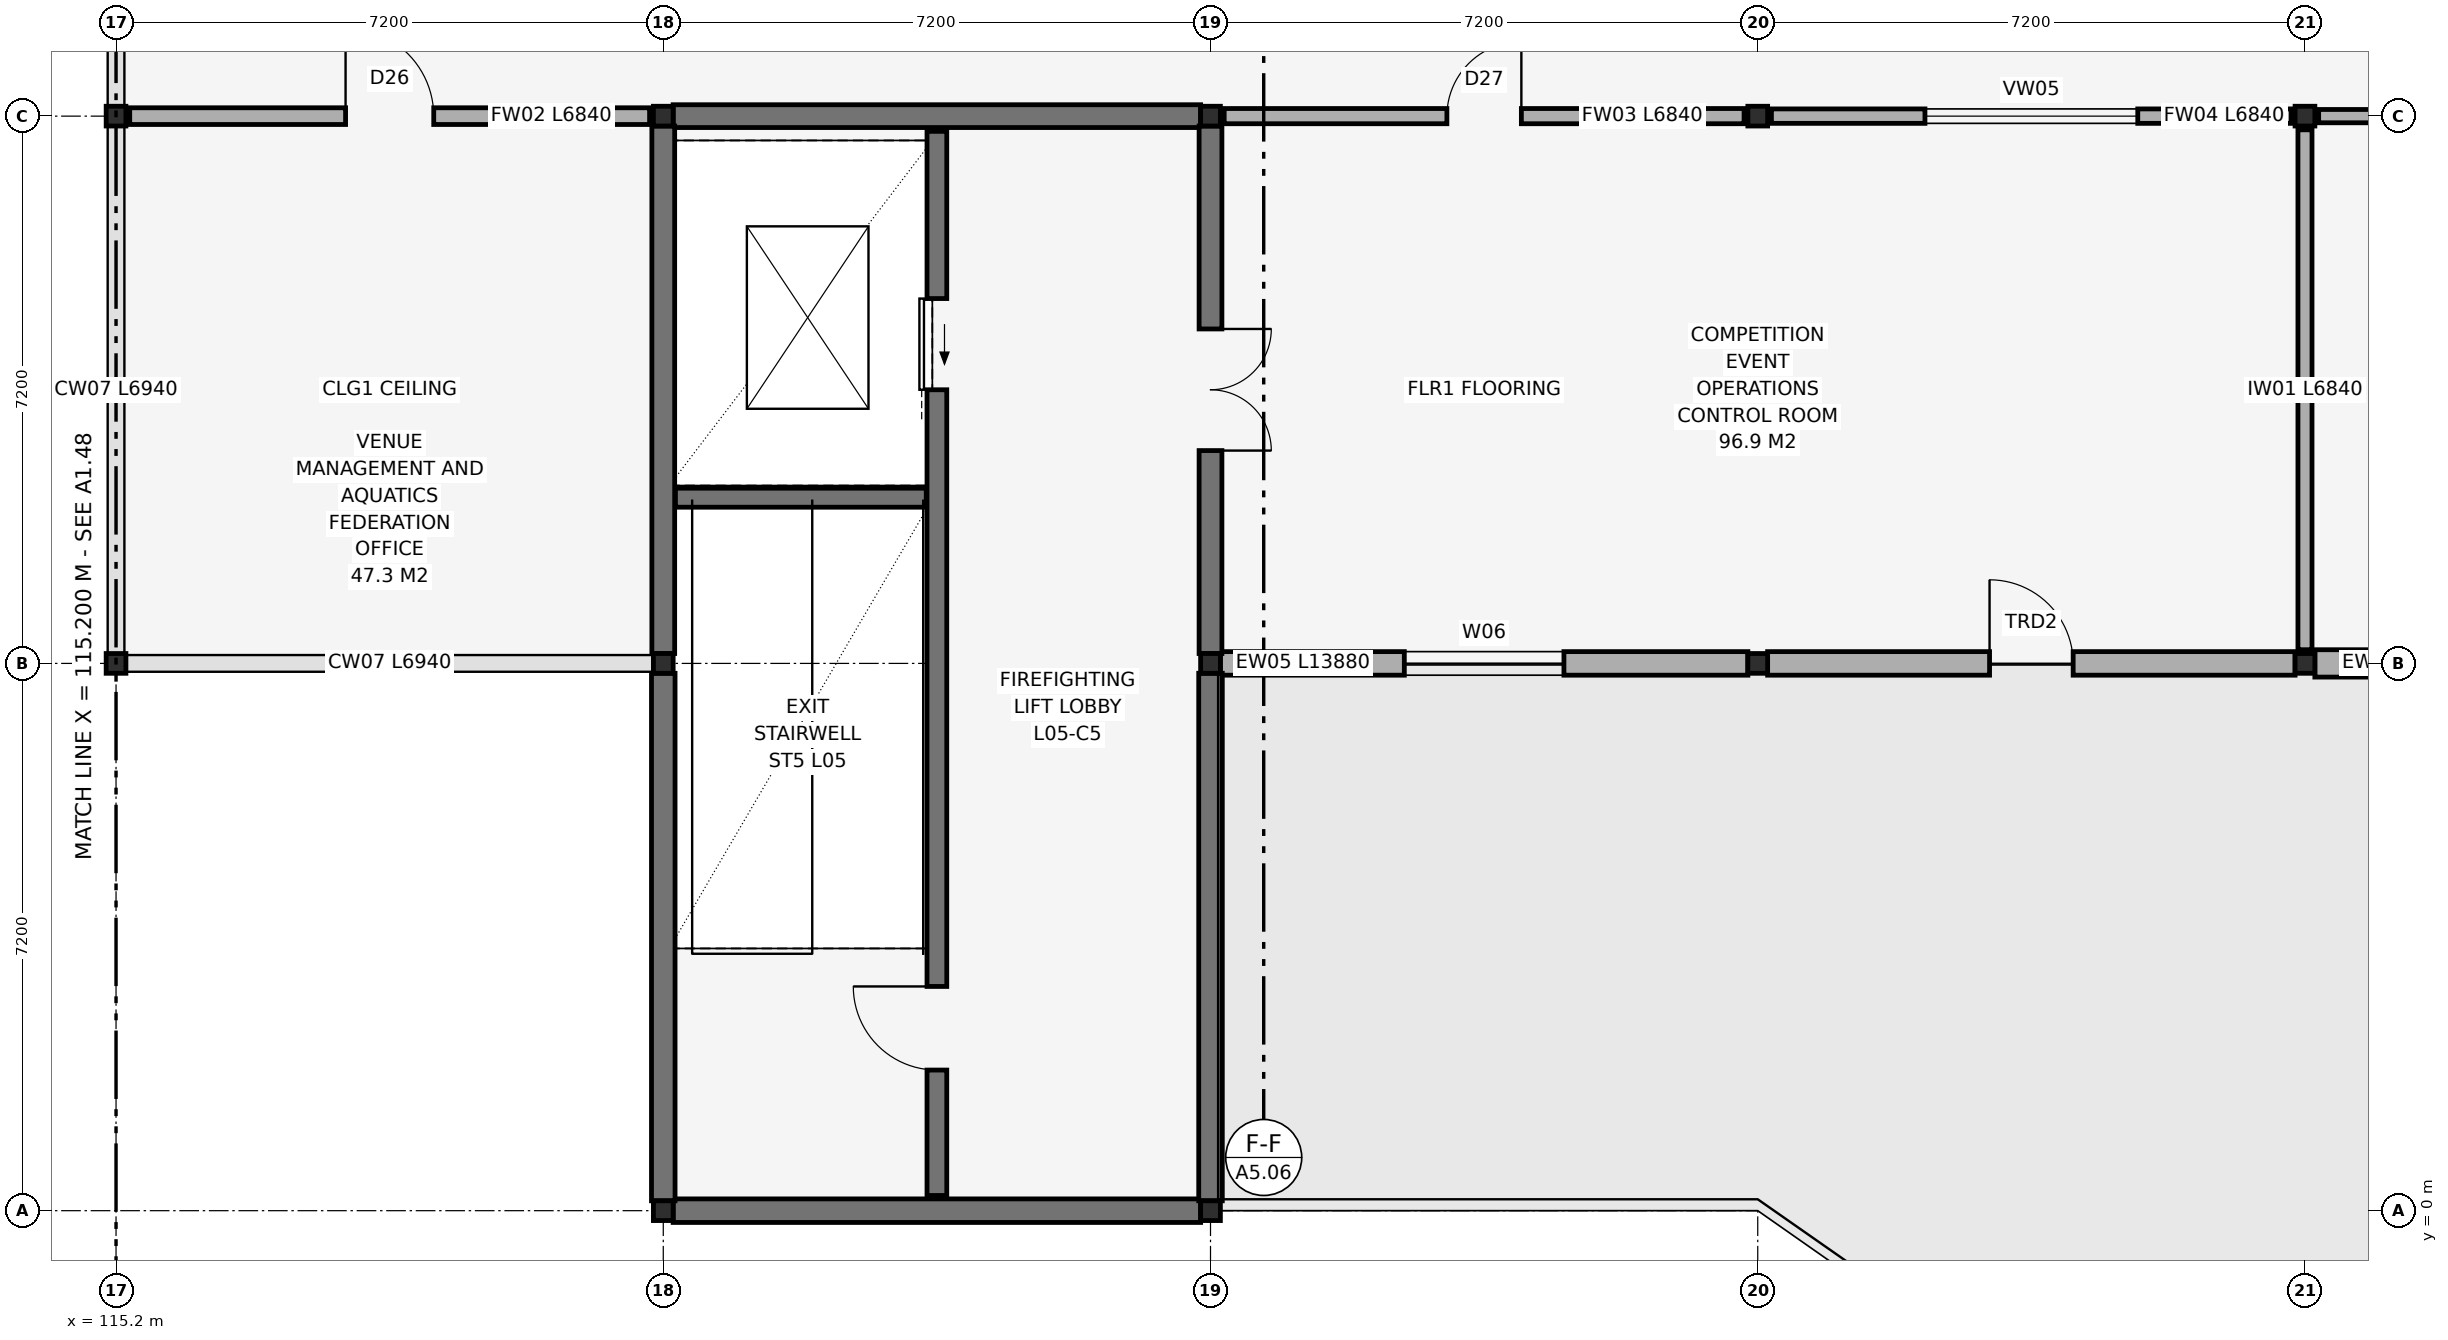
"""IFC4 building model, lengths in metres.
Left out: names, types, materials, properties, quantities, classifications, styles, units other than length and angle.
Written with IfcOpenShell. Run it as: python <this file> out.ifc"""

import sys

from ifc_helpers import new_model, si_unit, direction, frame, frame_2d, origin, origin_2d, place, context, subcontext, project, spatial, rectangle, hollow_rectangle, extrude, element, fill, save


model = new_model("IFC4")
c1 = context("Model", 3, precision=1e-05, world=origin(), true_north=direction((0.0, 1.0)))
c2 = subcontext(c1, "Body", "Model", "MODEL_VIEW")
j1 = project(units=[si_unit("LENGTHUNIT", "METRE"), si_unit("PLANEANGLEUNIT", "RADIAN")], contexts=[c1])
p1 = place(None, origin())
s1 = spatial("IfcSite", under=j1, at=p1, CompositionType="ELEMENT")
p2 = place(p1, origin())
s2 = spatial("IfcBuilding", under=s1, at=p2, CompositionType="ELEMENT")
p3 = place(p2, frame((0.0, 0.0, 23.4)))
s3 = spatial("IfcBuildingStorey", under=s2, at=p3, CompositionType="ELEMENT", Elevation=23.4)
for number, where, z_axis, x_axis in (
    (1, (115.2, 7.2, 0.0), (0.0, 0.0, 1.0), (1.0, 0.0, 0.0)),
    (2, (115.2, 14.4, 0.0), (0.0, 0.0, 1.0), (1.0, 0.0, 0.0)),
    (3, (122.4, 0.0, 0.0), (0.0, 0.0, 1.0), (1.0, 0.0, 0.0)),
    (4, (122.4, 7.2, 0.0), (0.0, 0.0, 1.0), (1.0, 0.0, 0.0)),
    (5, (122.4, 14.4, 0.0), (0.0, 0.0, 1.0), (1.0, 0.0, 0.0)),
    (6, (129.6, 0.0, 0.0), (0.0, 0.0, 1.0), (1.0, 0.0, 0.0)),
    (7, (129.6, 7.2, 0.0), (0.0, 0.0, 1.0), (1.0, 0.0, 0.0)),
    (8, (129.6, 14.4, 0.0), (0.0, 0.0, 1.0), (1.0, 0.0, 0.0)),
    (9, (136.8, 7.2, 0.0), (0.0, 0.0, 1.0), (1.0, 0.0, 0.0)),
    (10, (136.8, 14.4, 0.0), (0.0, 0.0, 1.0), (1.0, 0.0, 0.0)),
    (11, (144.0, 7.2, 0.0), (0.0, 0.0, 1.0), (1.0, 0.0, 0.0)),
    (12, (144.0, 14.4, 0.0), (0.0, 0.0, 1.0), (1.0, 0.0, 0.0)),
):
    element("IfcColumn", number, at=place(p3, frame(where, z_axis=z_axis, x_axis=x_axis)), inside=s3, PredefinedType="COLUMN", context=c2, shape_type="SweptSolid", body=[
        extrude(hollow_rectangle(XDim=0.26, YDim=0.26, WallThickness=0.012, at=origin_2d()), origin(), (0.0, 0.0, 1.0), 4.2),
    ])
p4 = place(p3, frame((129.73, 7.2, 0.0), z_axis=(0.0, 0.0, 1.0), x_axis=(1.0, 0.0, 0.0)))
e13 = element("IfcWall", 13, at=p4, inside=s3, PredefinedType="SOLIDWALL", context=c2, shape_type="SweptSolid", body=[
    extrude(rectangle(XDim=6.94, YDim=0.31, at=frame_2d((3.47, 0.0))), origin(), (0.0, 0.0, 1.0), 3.505),
])
p5 = place(p4, frame((2.42, 0.0, 0.95)))
e14 = element("IfcOpeningElement", 14, at=p5, cuts=e13, PredefinedType="OPENING", context=c2, shape_type="SweptSolid", body=[
    extrude(rectangle(XDim=2.1, YDim=2.0, at=frame_2d((1.05, 1.0))), frame((0.0, 0.17, 0.0), z_axis=(0.0, -1.0, 0.0), x_axis=(1.0, 0.0, 0.0)), (0.0, 0.0, 1.0), 0.34),
])
p6 = place(p3, frame((136.93, 7.2, 0.0), z_axis=(0.0, 0.0, 1.0), x_axis=(1.0, 0.0, 0.0)))
e15 = element("IfcWall", 15, at=p6, inside=s3, PredefinedType="SOLIDWALL", context=c2, shape_type="SweptSolid", body=[
    extrude(rectangle(XDim=6.94, YDim=0.31, at=frame_2d((3.47, 0.0))), origin(), (0.0, 0.0, 1.0), 3.98),
])
p7 = place(p6, frame((2.92, 0.0, 0.0)))
e16 = element("IfcOpeningElement", 16, at=p7, cuts=e15, PredefinedType="OPENING", context=c2, shape_type="SweptSolid", body=[
    extrude(rectangle(XDim=1.1, YDim=2.2, at=frame_2d((0.55, 1.1))), frame((0.0, 0.17, 0.0), z_axis=(0.0, -1.0, 0.0), x_axis=(1.0, 0.0, 0.0)), (0.0, 0.0, 1.0), 0.34),
])
p8 = place(p3, frame((144.13, 7.2, 0.0), z_axis=(0.0, 0.0, 1.0), x_axis=(1.0, 0.0, 0.0)))
e17 = element("IfcWall", 17, at=p8, inside=s3, PredefinedType="SOLIDWALL", context=c2, shape_type="SweptSolid", body=[
    extrude(rectangle(XDim=6.94, YDim=0.36, at=frame_2d((3.47, 0.0))), origin(), (0.0, 0.0, 1.0), 3.98),
])
p9 = place(p8, frame((2.57, 0.0, 0.95)))
e18 = element("IfcOpeningElement", 18, at=p9, cuts=e17, PredefinedType="OPENING", context=c2, shape_type="SweptSolid", body=[
    extrude(rectangle(XDim=1.8, YDim=1.75, at=frame_2d((0.9, 0.875))), frame((0.0, 0.195, 0.0), z_axis=(0.0, -1.0, 0.0), x_axis=(1.0, 0.0, 0.0)), (0.0, 0.0, 1.0), 0.39),
])
p10 = place(p3, frame((122.53, 0.0, 0.0), z_axis=(0.0, 0.0, 1.0), x_axis=(1.0, 0.0, 0.0)))
e19 = element("IfcWall", 19, at=p10, inside=s3, PredefinedType="SHEAR", context=c2, shape_type="SweptSolid", body=[
    extrude(rectangle(XDim=6.94, YDim=0.31, at=frame_2d((3.47, 0.0))), origin(), (0.0, 0.0, 1.0), 4.0),
])
p11 = place(p3, frame((122.53, 14.4, 0.0), z_axis=(0.0, 0.0, 1.0), x_axis=(1.0, 0.0, 0.0)))
e20 = element("IfcWall", 20, at=p11, inside=s3, PredefinedType="SHEAR", context=c2, shape_type="SweptSolid", body=[
    extrude(rectangle(XDim=6.94, YDim=0.3, at=frame_2d((3.47, 0.0))), origin(), (0.0, 0.0, 1.0), 4.0),
])
p12 = place(p3, frame((122.4, 0.13, 0.0), z_axis=(0.0, 0.0, 1.0), x_axis=(0.0, 1.0, 0.0)))
e21 = element("IfcWall", 21, at=p12, inside=s3, PredefinedType="SHEAR", context=c2, shape_type="SweptSolid", body=[
    extrude(rectangle(XDim=6.94, YDim=0.31, at=frame_2d((3.47, 0.0))), origin(), (0.0, 0.0, 1.0), 4.0),
])
p13 = place(p3, frame((122.4, 7.33, 0.0), z_axis=(0.0, 0.0, 1.0), x_axis=(0.0, 1.0, 0.0)))
e22 = element("IfcWall", 22, at=p13, inside=s3, PredefinedType="SHEAR", context=c2, shape_type="SweptSolid", body=[
    extrude(rectangle(XDim=6.94, YDim=0.3, at=frame_2d((3.47, 0.0))), origin(), (0.0, 0.0, 1.0), 4.0),
])
p14 = place(p3, frame((129.6, 0.13, 0.0), z_axis=(0.0, 0.0, 1.0), x_axis=(0.0, 1.0, 0.0)))
e23 = element("IfcWall", 23, at=p14, inside=s3, PredefinedType="SHEAR", context=c2, shape_type="SweptSolid", body=[
    extrude(rectangle(XDim=6.94, YDim=0.31, at=frame_2d((3.47, 0.0))), origin(), (0.0, 0.0, 1.0), 4.0),
])
p15 = place(p3, frame((129.6, 7.33, 0.0), z_axis=(0.0, 0.0, 1.0), x_axis=(0.0, 1.0, 0.0)))
e24 = element("IfcWall", 24, at=p15, inside=s3, PredefinedType="SHEAR", context=c2, shape_type="SweptSolid", body=[
    extrude(rectangle(XDim=6.94, YDim=0.3, at=frame_2d((3.47, 0.0))), origin(), (0.0, 0.0, 1.0), 4.0),
])
p16 = place(p15, frame((2.67, 0.0, 0.0)))
e25 = element("IfcOpeningElement", 25, at=p16, cuts=e24, PredefinedType="OPENING", context=c2, shape_type="SweptSolid", body=[
    extrude(rectangle(XDim=1.6, YDim=2.2, at=frame_2d((0.8, 1.1))), frame((0.0, 0.165, 0.0), z_axis=(0.0, -1.0, 0.0), x_axis=(1.0, 0.0, 0.0)), (0.0, 0.0, 1.0), 0.33),
])
p17 = place(p3, frame((126.0, 0.2, 0.0), z_axis=(0.0, 0.0, 1.0), x_axis=(0.0, 1.0, 0.0)))
e26 = element("IfcWall", 26, at=p17, inside=s3, PredefinedType="SHEAR", context=c2, shape_type="SweptSolid", body=[
    extrude(rectangle(XDim=14.0, YDim=0.26, at=frame_2d((7.0, 0.0))), origin(), (0.0, 0.0, 1.0), 4.0),
])
p18 = place(p17, frame((1.65, 0.0, 0.0)))
e27 = element("IfcOpeningElement", 27, at=p18, cuts=e26, PredefinedType="OPENING", context=c2, shape_type="SweptSolid", body=[
    extrude(rectangle(XDim=1.1, YDim=2.15, at=frame_2d((0.55, 1.075))), frame((0.0, 0.145, 0.0), z_axis=(0.0, -1.0, 0.0), x_axis=(1.0, 0.0, 0.0)), (0.0, 0.0, 1.0), 0.29),
])
p19 = place(p17, frame((10.6, 0.0, 0.0)))
e28 = element("IfcOpeningElement", 28, at=p19, cuts=e26, PredefinedType="OPENING", context=c2, shape_type="SweptSolid", body=[
    extrude(rectangle(XDim=1.2, YDim=2.25, at=frame_2d((0.6, 1.125))), frame((0.0, 0.145, 0.0), z_axis=(0.0, -1.0, 0.0), x_axis=(1.0, 0.0, 0.0)), (0.0, 0.0, 1.0), 0.29),
])
p20 = place(p3, frame((122.56, 9.38, 0.0), z_axis=(0.0, 0.0, 1.0), x_axis=(1.0, 0.0, 0.0)))
e29 = element("IfcWall", 29, at=p20, inside=s3, PredefinedType="SHEAR", context=c2, shape_type="SweptSolid", body=[
    extrude(rectangle(XDim=3.3, YDim=0.25, at=frame_2d((1.65, 0.0))), origin(), (0.0, 0.0, 1.0), 4.0),
])
p21 = place(p3, frame((115.38, 14.4, 0.0), z_axis=(0.0, 0.0, 1.0), x_axis=(1.0, 0.0, 0.0)))
e30 = element("IfcWall", 30, at=p21, inside=s3, PredefinedType="SOLIDWALL", context=c2, shape_type="SweptSolid", body=[
    extrude(rectangle(XDim=6.84, YDim=0.22, at=frame_2d((3.42, 0.0))), origin(), (0.0, 0.0, 1.0), 3.98),
])
p22 = place(p21, frame((2.84, 0.0, 0.0)))
e31 = element("IfcOpeningElement", 31, at=p22, cuts=e30, PredefinedType="OPENING", context=c2, shape_type="SweptSolid", body=[
    extrude(rectangle(XDim=1.16, YDim=2.2, at=frame_2d((0.58, 1.1))), frame((0.0, 0.125, 0.0), z_axis=(0.0, -1.0, 0.0), x_axis=(1.0, 0.0, 0.0)), (0.0, 0.0, 1.0), 0.25),
])
p23 = place(p3, frame((129.78, 14.4, 0.0), z_axis=(0.0, 0.0, 1.0), x_axis=(1.0, 0.0, 0.0)))
e32 = element("IfcWall", 32, at=p23, inside=s3, PredefinedType="SOLIDWALL", context=c2, shape_type="SweptSolid", body=[
    extrude(rectangle(XDim=6.84, YDim=0.2, at=frame_2d((3.42, 0.0))), origin(), (0.0, 0.0, 1.0), 3.98),
])
p24 = place(p23, frame((2.93, 0.0, 0.0)))
e33 = element("IfcOpeningElement", 33, at=p24, cuts=e32, PredefinedType="OPENING", context=c2, shape_type="SweptSolid", body=[
    extrude(rectangle(XDim=0.98, YDim=2.15, at=frame_2d((0.49, 1.075))), frame((0.0, 0.115, 0.0), z_axis=(0.0, -1.0, 0.0), x_axis=(1.0, 0.0, 0.0)), (0.0, 0.0, 1.0), 0.23),
])
p25 = place(p3, frame((136.98, 14.4, 0.0), z_axis=(0.0, 0.0, 1.0), x_axis=(1.0, 0.0, 0.0)))
e34 = element("IfcWall", 34, at=p25, inside=s3, PredefinedType="SOLIDWALL", context=c2, shape_type="SweptSolid", body=[
    extrude(rectangle(XDim=6.84, YDim=0.19, at=frame_2d((3.42, 0.0))), origin(), (0.0, 0.0, 1.0), 3.98),
])
p26 = place(p25, frame((2.02, 0.0, 0.95)))
e35 = element("IfcOpeningElement", 35, at=p26, cuts=e34, PredefinedType="OPENING", context=c2, shape_type="SweptSolid", body=[
    extrude(rectangle(XDim=2.8, YDim=1.35, at=frame_2d((1.4, 0.675))), frame((0.0, 0.11, 0.0), z_axis=(0.0, -1.0, 0.0), x_axis=(1.0, 0.0, 0.0)), (0.0, 0.0, 1.0), 0.22),
])
p27 = place(p3, frame((144.0, 7.38, 0.0), z_axis=(0.0, 0.0, 1.0), x_axis=(0.0, 1.0, 0.0)))
e36 = element("IfcWall", 36, at=p27, inside=s3, PredefinedType="PARTITIONING", context=c2, shape_type="SweptSolid", body=[
    extrude(rectangle(XDim=6.84, YDim=0.185, at=frame_2d((3.42, 0.0))), origin(), (0.0, 0.0, 1.0), 3.98),
])
p28 = place(p3, frame((144.18, 14.4, 0.0), z_axis=(0.0, 0.0, 1.0), x_axis=(1.0, 0.0, 0.0)))
e37 = element("IfcWall", 37, at=p28, inside=s3, PredefinedType="PARTITIONING", context=c2, shape_type="SweptSolid", body=[
    extrude(rectangle(XDim=6.84, YDim=0.175, at=frame_2d((3.42, 0.0))), origin(), (0.0, 0.0, 1.0), 3.98),
])
p29 = place(p28, frame((2.94, 0.0, 0.0)))
e38 = element("IfcOpeningElement", 38, at=p29, cuts=e37, PredefinedType="OPENING", context=c2, shape_type="SweptSolid", body=[
    extrude(rectangle(XDim=0.96, YDim=2.15, at=frame_2d((0.48, 1.075))), frame((0.0, 0.103, 0.0), z_axis=(0.0, -1.0, 0.0), x_axis=(1.0, 0.0, 0.0)), (0.0, 0.0, 1.0), 0.205),
])
p30 = place(p5, origin())
e39 = element("IfcWindow", 39, at=p30, inside=s3, PartitioningType="SINGLE_PANEL", PredefinedType="WINDOW", context=c2, shape_type="SweptSolid", body=[
    extrude(rectangle(XDim=2.1, YDim=2.0, at=frame_2d((1.05, 1.0))), frame((0.0, 0.03, 0.0), z_axis=(0.0, -1.0, 0.0), x_axis=(1.0, 0.0, 0.0)), (0.0, 0.0, 1.0), 0.06),
])
fill(e14, e39)
p31 = place(p7, frame((1.1, 0.0, 0.0), z_axis=(0.0, 0.0, 1.0), x_axis=(-1.0, 0.0, 0.0)))
e40 = element("IfcDoor", 40, at=p31, inside=s3, OperationType="SINGLE_SWING_RIGHT", PredefinedType="DOOR", context=c2, shape_type="SweptSolid", body=[
    extrude(rectangle(XDim=1.1, YDim=2.2, at=frame_2d((0.55, 1.1))), frame((0.0, 0.025, 0.0), z_axis=(0.0, -1.0, 0.0), x_axis=(1.0, 0.0, 0.0)), (0.0, 0.0, 1.0), 0.05),
])
fill(e16, e40)
p32 = place(p18, origin())
e41 = element("IfcDoor", 41, at=p32, inside=s3, OperationType="SINGLE_SWING_RIGHT", PredefinedType="DOOR", context=c2, shape_type="SweptSolid", body=[
    extrude(rectangle(XDim=1.1, YDim=2.15, at=frame_2d((0.55, 1.075))), frame((0.0, 0.025, 0.0), z_axis=(0.0, -1.0, 0.0), x_axis=(1.0, 0.0, 0.0)), (0.0, 0.0, 1.0), 0.05),
])
fill(e27, e41)
p33 = place(p19, frame((1.2, 0.0, 0.0), z_axis=(0.0, 0.0, 1.0), x_axis=(-1.0, 0.0, 0.0)))
e42 = element("IfcDoor", 42, at=p33, inside=s3, OperationType="SLIDING_TO_LEFT", PredefinedType="DOOR", context=c2, shape_type="SweptSolid", body=[
    extrude(rectangle(XDim=1.2, YDim=2.25, at=frame_2d((0.6, 1.125))), frame((0.0, 0.025, 0.0), z_axis=(0.0, -1.0, 0.0), x_axis=(1.0, 0.0, 0.0)), (0.0, 0.0, 1.0), 0.05),
])
fill(e28, e42)
p34 = place(p16, frame((1.6, 0.0, 0.0), z_axis=(0.0, 0.0, 1.0), x_axis=(-1.0, 0.0, 0.0)))
e43 = element("IfcDoor", 43, at=p34, inside=s3, OperationType="DOUBLE_SWING_LEFT", PredefinedType="DOOR", context=c2, shape_type="SweptSolid", body=[
    extrude(rectangle(XDim=1.6, YDim=2.2, at=frame_2d((0.8, 1.1))), frame((0.0, 0.025, 0.0), z_axis=(0.0, -1.0, 0.0), x_axis=(1.0, 0.0, 0.0)), (0.0, 0.0, 1.0), 0.05),
])
fill(e25, e43)
p35 = place(p22, frame((1.16, 0.0, 0.0), z_axis=(0.0, 0.0, 1.0), x_axis=(-1.0, 0.0, 0.0)))
e44 = element("IfcDoor", 44, at=p35, inside=s3, OperationType="SINGLE_SWING_RIGHT", PredefinedType="DOOR", context=c2, shape_type="SweptSolid", body=[
    extrude(rectangle(XDim=1.16, YDim=2.2, at=frame_2d((0.58, 1.1))), frame((0.0, 0.025, 0.0), z_axis=(0.0, -1.0, 0.0), x_axis=(1.0, 0.0, 0.0)), (0.0, 0.0, 1.0), 0.05),
])
fill(e31, e44)
p36 = place(p24, frame((0.98, 0.0, 0.0), z_axis=(0.0, 0.0, 1.0), x_axis=(-1.0, 0.0, 0.0)))
e45 = element("IfcDoor", 45, at=p36, inside=s3, OperationType="SINGLE_SWING_LEFT", PredefinedType="DOOR", context=c2, shape_type="SweptSolid", body=[
    extrude(rectangle(XDim=0.98, YDim=2.15, at=frame_2d((0.49, 1.075))), frame((0.0, 0.025, 0.0), z_axis=(0.0, -1.0, 0.0), x_axis=(1.0, 0.0, 0.0)), (0.0, 0.0, 1.0), 0.05),
])
fill(e33, e45)
p37 = place(p26, origin())
e46 = element("IfcWindow", 46, at=p37, inside=s3, PartitioningType="SINGLE_PANEL", PredefinedType="WINDOW", context=c2, shape_type="SweptSolid", body=[
    extrude(rectangle(XDim=2.8, YDim=1.35, at=frame_2d((1.4, 0.675))), frame((0.0, 0.03, 0.0), z_axis=(0.0, -1.0, 0.0), x_axis=(1.0, 0.0, 0.0)), (0.0, 0.0, 1.0), 0.06),
])
fill(e35, e46)
save(model, sys.argv[1])
